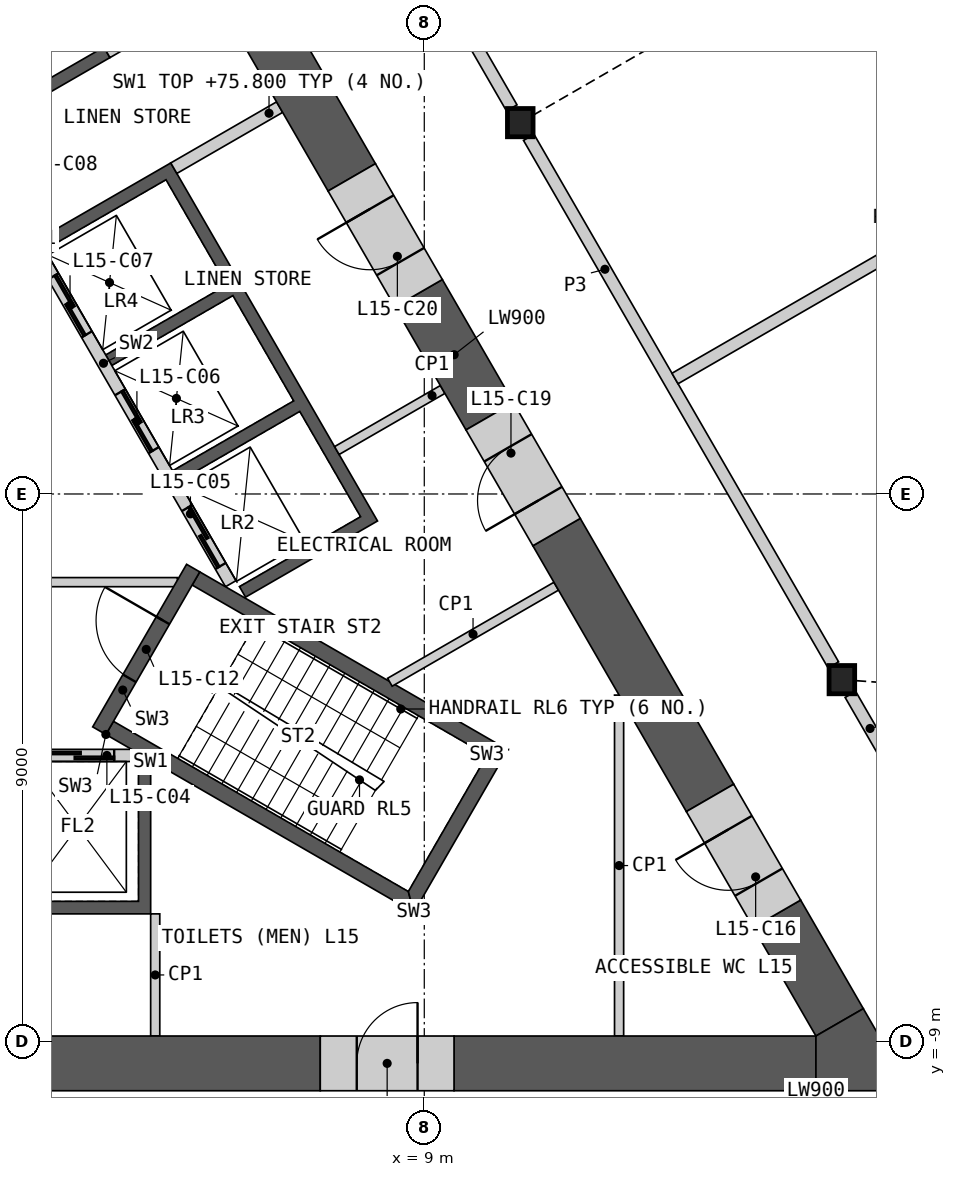
"""IFC4 building model, lengths in metres.
Left out: names, types, materials, properties, quantities, classifications, styles, units other than length and angle.
Written with IfcOpenShell. Run it as: python <this file> out.ifc"""

import sys

from ifc_helpers import new_model, si_unit, direction, frame, frame_2d, origin, origin_2d, place, context, subcontext, project, spatial, polyline, rectangle, i_section, outline, extrude, element, fill, save


model = new_model("IFC4")
c1 = context("Model", 3, precision=1e-05, world=origin(), true_north=direction((0.0, 1.0)))
c2 = subcontext(c1, "Body", "Model", "MODEL_VIEW")
j1 = project(units=[si_unit("LENGTHUNIT", "METRE"), si_unit("PLANEANGLEUNIT", "RADIAN")], contexts=[c1])
p1 = place(None, origin())
s1 = spatial("IfcSite", under=j1, at=p1, CompositionType="ELEMENT")
p2 = place(p1, origin())
s2 = spatial("IfcBuilding", under=s1, at=p2, CompositionType="ELEMENT")
p3 = place(p2, frame((0.0, 0.0, 72.0)))
s3 = spatial("IfcBuildingStorey", under=s2, at=p3, CompositionType="ELEMENT", Elevation=72.0)
for number, where, z_axis, x_axis in (
    (1, (15.868, -3.054, 0.0), (0.0, 0.0, 1.0), (1.0, 0.0, 0.0)),
    (2, (10.578, 6.107, 0.0), (0.0, 0.0, 1.0), (1.0, 0.0, 0.0)),
):
    element("IfcColumn", number, at=place(p3, frame(where, z_axis=z_axis, x_axis=x_axis)), inside=s3, PredefinedType="COLUMN", context=c2, shape_type="SweptSolid", body=[
        extrude(i_section(OverallWidth=0.421, OverallDepth=0.465, WebThickness=0.045, FlangeThickness=0.072, at=origin_2d()), origin(), (0.0, 0.0, 1.0), 4.2),
    ])
p4 = place(p3, origin())
e3 = element("IfcWall", 3, at=p4, inside=s3, PredefinedType="SHEAR", context=c2, shape_type="SweptSolid", body=[
    extrude(outline(polyline([(4.5, -4.4), (4.5, -6.906), (-4.5, -6.906), (-4.5, -4.4), (-4.3, -4.4), (-4.3, -6.7), (-2.3, -6.7), (-2.3, -4.4), (-2.1, -4.4), (-2.1, -6.7), (-0.1, -6.7), (-0.1, -4.4), (0.1, -4.4), (0.1, -6.7), (2.1, -6.7), (2.1, -4.4), (2.3, -4.4), (2.3, -6.7), (4.3, -6.7), (4.3, -4.4), (4.5, -4.4)])), origin(), (0.0, 0.0, 1.0), 3.8),
])
p5 = place(p3, frame((-4.187, -4.3, 0.0), z_axis=(0.0, 0.0, 1.0), x_axis=(1.0, 0.0, 0.0)))
e4 = element("IfcWall", 4, at=p5, inside=s3, PredefinedType="SOLIDWALL", context=c2, shape_type="SweptSolid", body=[
    extrude(rectangle(XDim=8.373, YDim=0.2, at=frame_2d((4.187, 0.0))), origin(), (0.0, 0.0, 1.0), 3.8),
])
p6 = place(p5, frame((0.287, 0.0, 0.0)))
e5 = element("IfcOpeningElement", 5, at=p6, cuts=e4, PredefinedType="OPENING", context=c2, shape_type="SweptSolid", body=[
    extrude(rectangle(XDim=1.2, YDim=2.1, at=frame_2d((0.6, 1.05))), frame((0.0, 0.11, 0.0), z_axis=(0.0, -1.0, 0.0), x_axis=(1.0, 0.0, 0.0)), (0.0, 0.0, 1.0), 0.22),
])
p7 = place(p5, frame((2.387, 0.0, 0.0)))
e6 = element("IfcOpeningElement", 6, at=p7, cuts=e4, PredefinedType="OPENING", context=c2, shape_type="SweptSolid", body=[
    extrude(rectangle(XDim=1.4, YDim=2.1, at=frame_2d((0.7, 1.05))), frame((0.0, 0.11, 0.0), z_axis=(0.0, -1.0, 0.0), x_axis=(1.0, 0.0, 0.0)), (0.0, 0.0, 1.0), 0.22),
])
p8 = place(p5, frame((4.737, 0.0, 0.0)))
e7 = element("IfcOpeningElement", 7, at=p8, cuts=e4, PredefinedType="OPENING", context=c2, shape_type="SweptSolid", body=[
    extrude(rectangle(XDim=1.1, YDim=2.1, at=frame_2d((0.55, 1.05))), frame((0.0, 0.11, 0.0), z_axis=(0.0, -1.0, 0.0), x_axis=(1.0, 0.0, 0.0)), (0.0, 0.0, 1.0), 0.22),
])
p9 = place(p5, frame((6.887, 0.0, 0.0)))
e8 = element("IfcOpeningElement", 8, at=p9, cuts=e4, PredefinedType="OPENING", context=c2, shape_type="SweptSolid", body=[
    extrude(rectangle(XDim=1.2, YDim=2.1, at=frame_2d((0.6, 1.05))), frame((0.0, 0.11, 0.0), z_axis=(0.0, -1.0, 0.0), x_axis=(1.0, 0.0, 0.0)), (0.0, 0.0, 1.0), 0.22),
])
p10 = place(p3, origin())
e9 = element("IfcWall", 9, at=p10, inside=s3, PredefinedType="SHEAR", context=c2, shape_type="SweptSolid", body=[
    extrude(outline(polyline([(1.561, 6.097), (3.731, 7.35), (3.831, 7.177), (1.66, 5.924), (1.561, 6.097)])), origin(), (0.0, 0.0, 1.0), 3.8),
])
p11 = place(p3, origin())
e10 = element("IfcWall", 10, at=p11, inside=s3, PredefinedType="SHEAR", context=c2, shape_type="SweptSolid", body=[
    extrude(outline(polyline([(2.66, 4.192), (4.831, 5.445), (8.231, -0.444), (6.061, -1.697), (5.96, -1.524), (7.952, -0.374), (6.952, 1.358), (4.96, 0.208), (4.861, 0.381), (6.852, 1.531), (5.852, 3.263), (3.861, 2.113), (3.76, 2.287), (5.752, 3.437), (4.752, 5.169), (2.76, 4.019), (2.66, 4.192)])), origin(), (0.0, 0.0, 1.0), 3.8),
])
p12 = place(p3, frame((5.817, -1.476, 0.0), z_axis=(0.0, 0.0, 1.0), x_axis=(-0.500002616675, 0.866023893041, 0.0)))
e11 = element("IfcWall", 11, at=p12, inside=s3, PredefinedType="SOLIDWALL", context=c2, shape_type="SweptSolid", body=[
    extrude(rectangle(XDim=8.373, YDim=0.2, at=frame_2d((4.187, 0.0))), origin(), (0.0, 0.0, 1.0), 3.8),
])
p13 = place(p12, frame((0.337, 0.0, 0.0)))
e12 = element("IfcOpeningElement", 12, at=p13, cuts=e11, PredefinedType="OPENING", context=c2, shape_type="SweptSolid", body=[
    extrude(rectangle(XDim=1.1, YDim=2.1, at=frame_2d((0.55, 1.05))), frame((0.0, 0.11, 0.0), z_axis=(0.0, -1.0, 0.0), x_axis=(1.0, 0.0, 0.0)), (0.0, 0.0, 1.0), 0.22),
])
p14 = place(p12, frame((2.537, 0.0, 0.0)))
e13 = element("IfcOpeningElement", 13, at=p14, cuts=e11, PredefinedType="OPENING", context=c2, shape_type="SweptSolid", body=[
    extrude(rectangle(XDim=1.1, YDim=2.1, at=frame_2d((0.55, 1.05))), frame((0.0, 0.11, 0.0), z_axis=(0.0, -1.0, 0.0), x_axis=(1.0, 0.0, 0.0)), (0.0, 0.0, 1.0), 0.22),
])
p15 = place(p12, frame((4.737, 0.0, 0.0)))
e14 = element("IfcOpeningElement", 14, at=p15, cuts=e11, PredefinedType="OPENING", context=c2, shape_type="SweptSolid", body=[
    extrude(rectangle(XDim=1.1, YDim=2.1, at=frame_2d((0.55, 1.05))), frame((0.0, 0.11, 0.0), z_axis=(0.0, -1.0, 0.0), x_axis=(1.0, 0.0, 0.0)), (0.0, 0.0, 1.0), 0.22),
])
p16 = place(p12, frame((7.037, 0.0, 0.0)))
e15 = element("IfcOpeningElement", 15, at=p16, cuts=e11, PredefinedType="OPENING", context=c2, shape_type="SweptSolid", body=[
    extrude(rectangle(XDim=0.9, YDim=2.1, at=frame_2d((0.45, 1.05))), frame((0.0, 0.11, 0.0), z_axis=(0.0, -1.0, 0.0), x_axis=(1.0, 0.0, 0.0)), (0.0, 0.0, 1.0), 0.22),
])
p17 = place(p3, frame((4.881, 5.358, 0.0), z_axis=(0.0, 0.0, 1.0), x_axis=(0.866035824272, 0.499981950752, 0.0)))
e16 = element("IfcWall", 16, at=p17, inside=s3, PredefinedType="SHEAR", context=c2, shape_type="SweptSolid", body=[
    extrude(rectangle(XDim=2.009, YDim=0.2, at=frame_2d((1.004, 0.0))), origin(), (0.0, 0.0, 1.0), 3.8),
])
p18 = place(p3, frame((3.781, 7.263, 0.0), z_axis=(0.0, 0.0, 1.0), x_axis=(0.865983199114, 0.50007309351, 0.0)))
e17 = element("IfcWall", 17, at=p18, inside=s3, PredefinedType="SHEAR", context=c2, shape_type="SweptSolid", body=[
    extrude(rectangle(XDim=2.009, YDim=0.2, at=frame_2d((1.004, 0.0))), origin(), (0.0, 0.0, 1.0), 3.8),
])
p19 = place(p3, frame((-4.941, -1.45, 0.0), z_axis=(0.0, 0.0, 1.0), x_axis=(1.0, 0.0, 0.0)))
e18 = element("IfcWall", 18, at=p19, inside=s3, PredefinedType="PARTITIONING", context=c2, shape_type="SweptSolid", body=[
    extrude(rectangle(XDim=9.882, YDim=0.15, at=frame_2d((4.941, 0.0))), origin(), (0.0, 0.0, 1.0), 3.8),
])
p20 = place(p19, frame((4.391, 0.0, 0.0)))
e19 = element("IfcOpeningElement", 19, at=p20, cuts=e18, PredefinedType="OPENING", context=c2, shape_type="SweptSolid", body=[
    extrude(rectangle(XDim=1.1, YDim=2.1, at=frame_2d((0.55, 1.05))), frame((0.0, 0.085, 0.0), z_axis=(0.0, -1.0, 0.0), x_axis=(1.0, 0.0, 0.0)), (0.0, 0.0, 1.0), 0.17),
])
p21 = place(p3, origin())
e20 = element("IfcWall", 20, at=p21, inside=s3, PredefinedType="SHEAR", context=c2, shape_type="SweptSolid", body=[
    extrude(outline(polyline([(3.763, -3.956), (8.83, -6.881), (8.738, -6.539), (3.888, -3.739), (3.763, -3.956)])), origin(), (0.0, 0.0, 1.0), 3.8),
])
p22 = place(p3, origin())
e21 = element("IfcWall", 21, at=p22, inside=s3, PredefinedType="SHEAR", context=c2, shape_type="SweptSolid", body=[
    extrude(outline(polyline([(8.83, -6.881), (10.374, -4.206), (10.032, -4.298), (8.738, -6.539), (8.83, -6.881)])), origin(), (0.0, 0.0, 1.0), 3.8),
])
p23 = place(p3, origin())
e22 = element("IfcWall", 22, at=p23, inside=s3, PredefinedType="SHEAR", context=c2, shape_type="SweptSolid", body=[
    extrude(outline(polyline([(10.032, -4.298), (10.374, -4.206), (5.307, -1.281), (5.182, -1.498), (10.032, -4.298)])), origin(), (0.0, 0.0, 1.0), 3.8),
])
p24 = place(p3, frame((3.655, -3.893, 0.0), z_axis=(0.0, 0.0, 1.0), x_axis=(0.499982516597, 0.866035497597, 0.0)))
e23 = element("IfcWall", 23, at=p24, inside=s3, PredefinedType="SHEAR", context=c2, shape_type="SweptSolid", body=[
    extrude(rectangle(XDim=3.088, YDim=0.25, at=frame_2d((1.544, 0.0))), origin(), (0.0, 0.0, 1.0), 3.8),
])
p25 = place(p24, frame((0.994, 0.0, 0.0)))
e24 = element("IfcOpeningElement", 24, at=p25, cuts=e23, PredefinedType="OPENING", context=c2, shape_type="SweptSolid", body=[
    extrude(rectangle(XDim=1.1, YDim=2.1, at=frame_2d((0.55, 1.05))), frame((0.0, 0.135, 0.0), z_axis=(0.0, -1.0, 0.0), x_axis=(1.0, 0.0, 0.0)), (0.0, 0.0, 1.0), 0.27),
])
p26 = place(p3, frame((4.575, -6.906, 0.0), z_axis=(0.0, 0.0, 1.0), x_axis=(0.0, -1.0, 0.0)))
e25 = element("IfcWall", 25, at=p26, inside=s3, PredefinedType="PARTITIONING", context=c2, shape_type="SweptSolid", body=[
    extrude(rectangle(XDim=2.009, YDim=0.15, at=frame_2d((1.004, 0.0))), origin(), (0.0, 0.0, 1.0), 3.8),
])
p27 = place(p3, frame((9.302, 1.719, 0.0), z_axis=(0.0, 0.0, 1.0), x_axis=(-0.866035824272, -0.499981950752, 0.0)))
e26 = element("IfcWall", 26, at=p27, inside=s3, PredefinedType="PARTITIONING", context=c2, shape_type="SweptSolid", body=[
    extrude(rectangle(XDim=2.009, YDim=0.15, at=frame_2d((1.004, 0.0))), origin(), (0.0, 0.0, 1.0), 3.8),
])
p28 = place(p3, frame((11.17, -1.517, 0.0), z_axis=(0.0, 0.0, 1.0), x_axis=(-0.866037599206, -0.499978876315, 0.0)))
e27 = element("IfcWall", 27, at=p28, inside=s3, PredefinedType="PARTITIONING", context=c2, shape_type="SweptSolid", body=[
    extrude(rectangle(XDim=3.159, YDim=0.15, at=frame_2d((1.58, 0.0))), origin(), (0.0, 0.0, 1.0), 3.8),
])
p29 = place(p3, frame((12.204, -8.915, 0.0), z_axis=(0.0, 0.0, 1.0), x_axis=(0.0, 1.0, 0.0)))
e28 = element("IfcWall", 28, at=p29, inside=s3, PredefinedType="PARTITIONING", context=c2, shape_type="SweptSolid", body=[
    extrude(rectangle(XDim=5.607, YDim=0.15, at=frame_2d((2.804, 0.0))), origin(), (0.0, 0.0, 1.0), 3.8),
])
p30 = place(p3, frame((1.1, -9.365, 0.0), z_axis=(0.0, 0.0, 1.0), x_axis=(1.0, 0.0, 0.0)))
e29 = element("IfcWall", 29, at=p30, inside=s3, PredefinedType="SHEAR", context=c2, shape_type="SweptSolid", body=[
    extrude(rectangle(XDim=6.189, YDim=0.9, at=frame_2d((3.095, 0.0))), origin(), (0.0, 0.0, 1.0), 3.8),
])
p31 = place(p3, frame((9.49, -9.365, 0.0), z_axis=(0.0, 0.0, 1.0), x_axis=(1.0, 0.0, 0.0)))
e30 = element("IfcWall", 30, at=p31, inside=s3, PredefinedType="SHEAR", context=c2, shape_type="SweptSolid", body=[
    extrude(rectangle(XDim=5.952, YDim=0.9, at=frame_2d((2.976, 0.0))), origin(), (0.0, 0.0, 1.0), 3.8),
])
p32 = place(p3, frame((7.807, 5.208, 0.0), z_axis=(0.0, 0.0, 1.0), x_axis=(-0.499986664161, 0.866033103098, 0.0)))
e31 = element("IfcWall", 31, at=p32, inside=s3, PredefinedType="SHEAR", context=c2, shape_type="SweptSolid", body=[
    extrude(rectangle(XDim=6.586, YDim=0.9, at=frame_2d((3.293, 0.0))), origin(), (0.0, 0.0, 1.0), 3.8),
])
p33 = place(p3, frame((13.7, -4.999, 0.0), z_axis=(0.0, 0.0, 1.0), x_axis=(-0.499993158726, 0.86602935356, 0.0)))
e32 = element("IfcWall", 32, at=p33, inside=s3, PredefinedType="SHEAR", context=c2, shape_type="SweptSolid", body=[
    extrude(rectangle(XDim=5.048, YDim=0.9, at=frame_2d((2.524, 0.0))), origin(), (0.0, 0.0, 1.0), 3.8),
])
p34 = place(p3, frame((10.075, 1.279, 0.0), z_axis=(0.0, 0.0, 1.0), x_axis=(-0.500026924946, 0.866009858102, 0.0)))
e33 = element("IfcWall", 33, at=p34, inside=s3, PredefinedType="SHEAR", context=c2, shape_type="SweptSolid", body=[
    extrude(rectangle(XDim=2.337, YDim=0.9, at=frame_2d((1.168, 0.0))), origin(), (0.0, 0.0, 1.0), 3.8),
])
p35 = place(p3, frame((15.831, -8.69, 0.0), z_axis=(0.0, 0.0, 1.0), x_axis=(-0.499971832445, 0.866041665719, 0.0)))
e34 = element("IfcWall", 34, at=p35, inside=s3, PredefinedType="SHEAR", context=c2, shape_type="SweptSolid", body=[
    extrude(rectangle(XDim=2.062, YDim=0.9, at=frame_2d((1.031, 0.0))), origin(), (0.0, 0.0, 1.0), 3.8),
])
p36 = place(p3, origin())
e35 = element("IfcWall", 35, at=p36, inside=s3, PredefinedType="SHEAR", context=c2, shape_type="SweptSolid", body=[
    extrude(outline(polyline([(15.441, -9.815), (15.441, -8.915), (16.221, -8.465), (17.0, -9.815), (15.441, -9.815)])), origin(), (0.0, 0.0, 1.0), 3.8),
])
p37 = place(p3, frame((14.8, -6.904, 0.0), z_axis=(0.0, 0.0, 1.0), x_axis=(-0.50002983664, 0.866008176907, 0.0)))
e36 = element("IfcWall", 36, at=p37, inside=s3, PredefinedType="SHEAR", context=c2, shape_type="SweptSolid", body=[
    extrude(rectangle(XDim=2.2, YDim=0.9, at=frame_2d((1.1, 0.0))), origin(), (0.0, 0.0, 1.0), 3.8),
])
p38 = place(p37, frame((0.6, 0.0, 0.0)))
e37 = element("IfcOpeningElement", 37, at=p38, cuts=e36, PredefinedType="OPENING", context=c2, shape_type="SweptSolid", body=[
    extrude(rectangle(XDim=1.0, YDim=2.1, at=frame_2d((0.5, 1.05))), frame((0.0, 0.46, 0.0), z_axis=(0.0, -1.0, 0.0), x_axis=(1.0, 0.0, 0.0)), (0.0, 0.0, 1.0), 0.92),
])
p39 = place(p3, frame((7.289, -9.365, 0.0), z_axis=(0.0, 0.0, 1.0), x_axis=(1.0, 0.0, 0.0)))
e38 = element("IfcWall", 38, at=p39, inside=s3, PredefinedType="SHEAR", context=c2, shape_type="SweptSolid", body=[
    extrude(rectangle(XDim=2.2, YDim=0.9, at=frame_2d((1.1, 0.0))), origin(), (0.0, 0.0, 1.0), 3.8),
])
p40 = place(p39, frame((0.6, 0.0, 0.0)))
e39 = element("IfcOpeningElement", 39, at=p40, cuts=e38, PredefinedType="OPENING", context=c2, shape_type="SweptSolid", body=[
    extrude(rectangle(XDim=1.0, YDim=2.1, at=frame_2d((0.5, 1.05))), frame((0.0, 0.46, 0.0), z_axis=(0.0, -1.0, 0.0), x_axis=(1.0, 0.0, 0.0)), (0.0, 0.0, 1.0), 0.92),
])
p41 = place(p3, frame((11.176, -0.627, 0.0), z_axis=(0.0, 0.0, 1.0), x_axis=(-0.499946605688, 0.86605622881, 0.0)))
e40 = element("IfcWall", 40, at=p41, inside=s3, PredefinedType="SHEAR", context=c2, shape_type="SweptSolid", body=[
    extrude(rectangle(XDim=2.2, YDim=0.9, at=frame_2d((1.1, 0.0))), origin(), (0.0, 0.0, 1.0), 3.8),
])
p42 = place(p41, frame((0.6, 0.0, 0.0)))
e41 = element("IfcOpeningElement", 41, at=p42, cuts=e40, PredefinedType="OPENING", context=c2, shape_type="SweptSolid", body=[
    extrude(rectangle(XDim=1.0, YDim=2.1, at=frame_2d((0.5, 1.05))), frame((0.0, 0.46, 0.0), z_axis=(0.0, -1.0, 0.0), x_axis=(1.0, 0.0, 0.0)), (0.0, 0.0, 1.0), 0.92),
])
p43 = place(p3, frame((8.907, 3.302, 0.0), z_axis=(0.0, 0.0, 1.0), x_axis=(-0.50002983664, 0.866008176907, 0.0)))
e42 = element("IfcWall", 42, at=p43, inside=s3, PredefinedType="SHEAR", context=c2, shape_type="SweptSolid", body=[
    extrude(rectangle(XDim=2.2, YDim=0.9, at=frame_2d((1.1, 0.0))), origin(), (0.0, 0.0, 1.0), 3.8),
])
p44 = place(p43, frame((0.6, 0.0, 0.0)))
e43 = element("IfcOpeningElement", 43, at=p44, cuts=e42, PredefinedType="OPENING", context=c2, shape_type="SweptSolid", body=[
    extrude(rectangle(XDim=1.0, YDim=2.1, at=frame_2d((0.5, 1.05))), frame((0.0, 0.46, 0.0), z_axis=(0.0, -1.0, 0.0), x_axis=(1.0, 0.0, 0.0)), (0.0, 0.0, 1.0), 0.92),
])
p45 = place(p3, frame((10.719, 5.865, 0.0), z_axis=(0.0, 0.0, 1.0), x_axis=(0.49999175339, -0.866030164915, 0.0)))
e44 = element("IfcWall", 44, at=p45, inside=s3, PredefinedType="PARTITIONING", context=c2, shape_type="SweptSolid", body=[
    extrude(rectangle(XDim=10.019, YDim=0.2, at=frame_2d((5.009, 0.0))), origin(), (0.0, 0.0, 1.0), 3.8),
])
p46 = place(p3, frame((5.429, 15.026, 0.0), z_axis=(0.0, 0.0, 1.0), x_axis=(0.50001002959, -0.86601961312, 0.0)))
e45 = element("IfcWall", 45, at=p46, inside=s3, PredefinedType="PARTITIONING", context=c2, shape_type="SweptSolid", body=[
    extrude(rectangle(XDim=10.019, YDim=0.2, at=frame_2d((5.009, 0.0))), origin(), (0.0, 0.0, 1.0), 3.8),
])
p47 = place(p46, frame((7.165, 0.0, 0.0)))
e46 = element("IfcOpeningElement", 46, at=p47, cuts=e45, PredefinedType="OPENING", context=c2, shape_type="SweptSolid", body=[
    extrude(rectangle(XDim=1.0, YDim=2.1, at=frame_2d((0.5, 1.05))), frame((0.0, 0.11, 0.0), z_axis=(0.0, -1.0, 0.0), x_axis=(1.0, 0.0, 0.0)), (0.0, 0.0, 1.0), 0.22),
])
p48 = place(p3, frame((16.008, -3.296, 0.0), z_axis=(0.0, 0.0, 1.0), x_axis=(0.499984737558, -0.86603421538, 0.0)))
e47 = element("IfcWall", 47, at=p48, inside=s3, PredefinedType="PARTITIONING", context=c2, shape_type="SweptSolid", body=[
    extrude(rectangle(XDim=6.473, YDim=0.2, at=frame_2d((3.236, 0.0))), origin(), (0.0, 0.0, 1.0), 3.8),
])
p49 = place(p48, frame((2.285, 0.0, 0.0)))
e48 = element("IfcOpeningElement", 48, at=p49, cuts=e47, PredefinedType="OPENING", context=c2, shape_type="SweptSolid", body=[
    extrude(rectangle(XDim=1.8, YDim=2.1, at=frame_2d((0.9, 1.05))), frame((0.0, 0.11, 0.0), z_axis=(0.0, -1.0, 0.0), x_axis=(1.0, 0.0, 0.0)), (0.0, 0.0, 1.0), 0.22),
])
p50 = place(p3, frame((13.124, 1.899, 0.0), z_axis=(0.0, 0.0, 1.0), x_axis=(0.866024086673, 0.500002281298, 0.0)))
e49 = element("IfcWall", 49, at=p50, inside=s3, PredefinedType="PARTITIONING", context=c2, shape_type="SweptSolid", body=[
    extrude(rectangle(XDim=8.584, YDim=0.2, at=frame_2d((4.292, 0.0))), origin(), (0.0, 0.0, 1.0), 2.885),
])
p51 = place(p9, origin())
e50 = element("IfcDoor", 50, at=p51, inside=s3, OperationType="SLIDING_TO_LEFT", PredefinedType="DOOR", context=c2, shape_type="SweptSolid", body=[
    extrude(rectangle(XDim=1.2, YDim=2.1, at=frame_2d((0.6, 1.05))), frame((0.0, 0.025, 0.0), z_axis=(0.0, -1.0, 0.0), x_axis=(1.0, 0.0, 0.0)), (0.0, 0.0, 1.0), 0.05),
])
fill(e8, e50)
p52 = place(p13, origin())
e51 = element("IfcDoor", 51, at=p52, inside=s3, OperationType="SLIDING_TO_LEFT", PredefinedType="DOOR", context=c2, shape_type="SweptSolid", body=[
    extrude(rectangle(XDim=1.1, YDim=2.1, at=frame_2d((0.55, 1.05))), frame((0.0, 0.025, 0.0), z_axis=(0.0, -1.0, 0.0), x_axis=(1.0, 0.0, 0.0)), (0.0, 0.0, 1.0), 0.05),
])
fill(e12, e51)
p53 = place(p14, origin())
e52 = element("IfcDoor", 52, at=p53, inside=s3, OperationType="SLIDING_TO_LEFT", PredefinedType="DOOR", context=c2, shape_type="SweptSolid", body=[
    extrude(rectangle(XDim=1.1, YDim=2.1, at=frame_2d((0.55, 1.05))), frame((0.0, 0.025, 0.0), z_axis=(0.0, -1.0, 0.0), x_axis=(1.0, 0.0, 0.0)), (0.0, 0.0, 1.0), 0.05),
])
fill(e13, e52)
p54 = place(p15, origin())
e53 = element("IfcDoor", 53, at=p54, inside=s3, OperationType="SLIDING_TO_LEFT", PredefinedType="DOOR", context=c2, shape_type="SweptSolid", body=[
    extrude(rectangle(XDim=1.1, YDim=2.1, at=frame_2d((0.55, 1.05))), frame((0.0, 0.025, 0.0), z_axis=(0.0, -1.0, 0.0), x_axis=(1.0, 0.0, 0.0)), (0.0, 0.0, 1.0), 0.05),
])
fill(e14, e53)
p55 = place(p25, origin())
e54 = element("IfcDoor", 54, at=p55, inside=s3, OperationType="SINGLE_SWING_RIGHT", PredefinedType="DOOR", context=c2, shape_type="SweptSolid", body=[
    extrude(rectangle(XDim=1.1, YDim=2.1, at=frame_2d((0.55, 1.05))), frame((0.0, 0.025, 0.0), z_axis=(0.0, -1.0, 0.0), x_axis=(1.0, 0.0, 0.0)), (0.0, 0.0, 1.0), 0.05),
])
fill(e24, e54)
p56 = place(p38, origin())
e55 = element("IfcDoor", 55, at=p56, inside=s3, OperationType="SINGLE_SWING_RIGHT", PredefinedType="DOOR", context=c2, shape_type="SweptSolid", body=[
    extrude(rectangle(XDim=1.0, YDim=2.1, at=frame_2d((0.5, 1.05))), frame((0.0, 0.205, 0.0), z_axis=(0.0, -1.0, 0.0), x_axis=(1.0, 0.0, 0.0)), (0.0, 0.0, 1.0), 0.05),
])
fill(e37, e55)
p57 = place(p40, origin())
e56 = element("IfcDoor", 56, at=p57, inside=s3, OperationType="SINGLE_SWING_RIGHT", PredefinedType="DOOR", context=c2, shape_type="SweptSolid", body=[
    extrude(rectangle(XDim=1.0, YDim=2.1, at=frame_2d((0.5, 1.05))), frame((0.0, 0.205, 0.0), z_axis=(0.0, -1.0, 0.0), x_axis=(1.0, 0.0, 0.0)), (0.0, 0.0, 1.0), 0.05),
])
fill(e39, e56)
p58 = place(p42, origin())
e57 = element("IfcDoor", 57, at=p58, inside=s3, OperationType="SINGLE_SWING_LEFT", PredefinedType="DOOR", context=c2, shape_type="SweptSolid", body=[
    extrude(rectangle(XDim=1.0, YDim=2.1, at=frame_2d((0.5, 1.05))), frame((0.0, 0.205, 0.0), z_axis=(0.0, -1.0, 0.0), x_axis=(1.0, 0.0, 0.0)), (0.0, 0.0, 1.0), 0.05),
])
fill(e41, e57)
p59 = place(p44, origin())
e58 = element("IfcDoor", 58, at=p59, inside=s3, OperationType="SINGLE_SWING_RIGHT", PredefinedType="DOOR", context=c2, shape_type="SweptSolid", body=[
    extrude(rectangle(XDim=1.0, YDim=2.1, at=frame_2d((0.5, 1.05))), frame((0.0, 0.205, 0.0), z_axis=(0.0, -1.0, 0.0), x_axis=(1.0, 0.0, 0.0)), (0.0, 0.0, 1.0), 0.05),
])
fill(e43, e58)
save(model, sys.argv[1])
